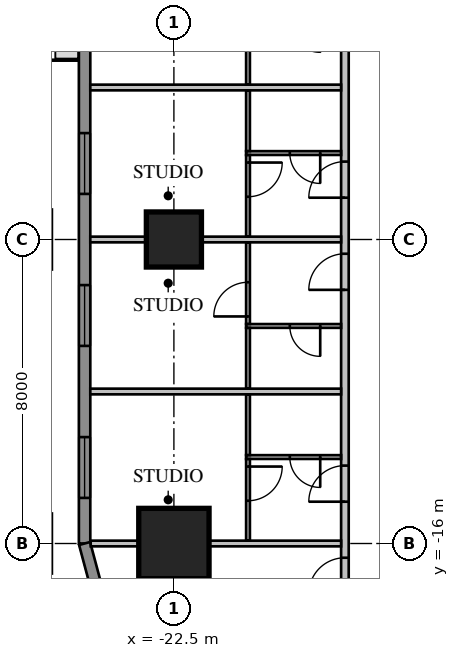
"""IFC4 building model, lengths in metres.
Left out: names, types, materials, properties, quantities, classifications, styles, units other than length and angle.
Written with IfcOpenShell. Run it as: python <this file> out.ifc"""

import sys

from ifc_helpers import new_model, si_unit, direction, frame, frame_2d, origin, origin_2d, place, context, subcontext, project, spatial, rectangle, extrude, element, fill, save


model = new_model("IFC4")
c1 = context("Model", 3, precision=1e-05, world=origin(), true_north=direction((0.0, 1.0)))
c2 = subcontext(c1, "Body", "Model", "MODEL_VIEW")
j1 = project(units=[si_unit("LENGTHUNIT", "METRE"), si_unit("PLANEANGLEUNIT", "RADIAN")], contexts=[c1])
p1 = place(None, origin())
s1 = spatial("IfcSite", under=j1, at=p1, CompositionType="ELEMENT")
p2 = place(p1, origin())
s2 = spatial("IfcBuilding", under=s1, at=p2, CompositionType="ELEMENT")
p3 = place(p2, frame((0.0, 0.0, 46.8)))
s3 = spatial("IfcBuildingStorey", under=s2, at=p3, CompositionType="ELEMENT", Elevation=46.8)
p4 = place(p3, frame((-22.5, -8.0, 0.0), z_axis=(0.0, 0.0, 1.0), x_axis=(1.0, 0.0, 0.0)))
e1 = element("IfcColumn", 1, at=p4, inside=s3, PredefinedType="COLUMN", context=c2, shape_type="SweptSolid", body=[
    extrude(rectangle(XDim=1.45, YDim=1.45, at=origin_2d()), origin(), (0.0, 0.0, 1.0), 3.85),
])
p5 = place(p3, frame((-22.5, -16.0, 0.0), z_axis=(0.0, 0.0, 1.0), x_axis=(1.0, 0.0, 0.0)))
e2 = element("IfcColumn", 2, at=p5, inside=s3, PredefinedType="COLUMN", context=c2, shape_type="SweptSolid", body=[
    extrude(rectangle(XDim=1.85, YDim=1.85, at=origin_2d()), origin(), (0.0, 0.0, 1.0), 3.85),
])
p6 = place(p3, frame((-24.85, 16.0, 0.0), z_axis=(0.0, 0.0, 1.0), x_axis=(0.0, -1.0, 0.0)))
e3 = element("IfcWall", 3, at=p6, inside=s3, PredefinedType="SOLIDWALL", context=c2, shape_type="SweptSolid", body=[
    extrude(rectangle(XDim=32.0, YDim=0.3, at=frame_2d((16.0, 0.0))), origin(), (0.0, 0.0, 1.0), 3.65),
])
p7 = place(p6, frame((1.2, 0.0, 0.75)))
e4 = element("IfcOpeningElement", 4, at=p7, cuts=e3, PredefinedType="OPENING", context=c2, shape_type="SweptSolid", body=[
    extrude(rectangle(XDim=1.6, YDim=1.8, at=frame_2d((0.8, 0.9))), frame((0.0, 0.17, 0.0), z_axis=(0.0, -1.0, 0.0), x_axis=(1.0, 0.0, 0.0)), (0.0, 0.0, 1.0), 0.34),
])
p8 = place(p6, frame((5.2, 0.0, 0.75)))
e5 = element("IfcOpeningElement", 5, at=p8, cuts=e3, PredefinedType="OPENING", context=c2, shape_type="SweptSolid", body=[
    extrude(rectangle(XDim=1.6, YDim=1.8, at=frame_2d((0.8, 0.9))), frame((0.0, 0.17, 0.0), z_axis=(0.0, -1.0, 0.0), x_axis=(1.0, 0.0, 0.0)), (0.0, 0.0, 1.0), 0.34),
])
p9 = place(p6, frame((17.2, 0.0, 0.75)))
e6 = element("IfcOpeningElement", 6, at=p9, cuts=e3, PredefinedType="OPENING", context=c2, shape_type="SweptSolid", body=[
    extrude(rectangle(XDim=1.6, YDim=1.8, at=frame_2d((0.8, 0.9))), frame((0.0, 0.17, 0.0), z_axis=(0.0, -1.0, 0.0), x_axis=(1.0, 0.0, 0.0)), (0.0, 0.0, 1.0), 0.34),
])
p10 = place(p6, frame((21.2, 0.0, 0.75)))
e7 = element("IfcOpeningElement", 7, at=p10, cuts=e3, PredefinedType="OPENING", context=c2, shape_type="SweptSolid", body=[
    extrude(rectangle(XDim=1.6, YDim=1.8, at=frame_2d((0.8, 0.9))), frame((0.0, 0.17, 0.0), z_axis=(0.0, -1.0, 0.0), x_axis=(1.0, 0.0, 0.0)), (0.0, 0.0, 1.0), 0.34),
])
p11 = place(p6, frame((25.2, 0.0, 0.75)))
e8 = element("IfcOpeningElement", 8, at=p11, cuts=e3, PredefinedType="OPENING", context=c2, shape_type="SweptSolid", body=[
    extrude(rectangle(XDim=1.6, YDim=1.8, at=frame_2d((0.8, 0.9))), frame((0.0, 0.17, 0.0), z_axis=(0.0, -1.0, 0.0), x_axis=(1.0, 0.0, 0.0)), (0.0, 0.0, 1.0), 0.34),
])
p12 = place(p6, frame((29.2, 0.0, 0.75)))
e9 = element("IfcOpeningElement", 9, at=p12, cuts=e3, PredefinedType="OPENING", context=c2, shape_type="SweptSolid", body=[
    extrude(rectangle(XDim=1.6, YDim=1.8, at=frame_2d((0.8, 0.9))), frame((0.0, 0.17, 0.0), z_axis=(0.0, -1.0, 0.0), x_axis=(1.0, 0.0, 0.0)), (0.0, 0.0, 1.0), 0.34),
])
p13 = place(p6, frame((8.8, 0.0, 0.75)))
e10 = element("IfcOpeningElement", 10, at=p13, cuts=e3, PredefinedType="OPENING", context=c2, shape_type="SweptSolid", body=[
    extrude(rectangle(XDim=2.4, YDim=1.8, at=frame_2d((1.2, 0.9))), frame((0.0, 0.17, 0.0), z_axis=(0.0, -1.0, 0.0), x_axis=(1.0, 0.0, 0.0)), (0.0, 0.0, 1.0), 0.34),
])
p14 = place(p6, frame((13.812, 0.0, 0.0)))
e11 = element("IfcOpeningElement", 11, at=p14, cuts=e3, PredefinedType="OPENING", context=c2, shape_type="SweptSolid", body=[
    extrude(rectangle(XDim=1.0, YDim=2.4, at=frame_2d((0.5, 1.2))), frame((0.0, 0.17, 0.0), z_axis=(0.0, -1.0, 0.0), x_axis=(1.0, 0.0, 0.0)), (0.0, 0.0, 1.0), 0.34),
])
p15 = place(p3, frame((-24.85, -16.0, 0.0), z_axis=(0.0, 0.0, 1.0), x_axis=(0.258839972501, -0.965920218567, 0.0)))
e12 = element("IfcWall", 12, at=p15, inside=s3, PredefinedType="SOLIDWALL", context=c2, shape_type="SweptSolid", body=[
    extrude(rectangle(XDim=4.581, YDim=0.3, at=frame_2d((2.291, 0.0))), origin(), (0.0, 0.0, 1.0), 3.65),
])
p16 = place(p3, frame((-18.0, 18.0, 0.0), z_axis=(0.0, 0.0, 1.0), x_axis=(0.0, -1.0, 0.0)))
e13 = element("IfcWall", 13, at=p16, inside=s3, PredefinedType="PARTITIONING", context=c2, shape_type="SweptSolid", body=[
    extrude(rectangle(XDim=36.0, YDim=0.2, at=frame_2d((18.0, 0.0))), origin(), (0.0, 0.0, 1.0), 3.65),
])
p17 = place(p16, frame((0.375, 0.0, 0.0)))
e14 = element("IfcOpeningElement", 14, at=p17, cuts=e13, PredefinedType="OPENING", context=c2, shape_type="SweptSolid", body=[
    extrude(rectangle(XDim=1.0, YDim=2.1, at=frame_2d((0.5, 1.05))), frame((0.0, 0.12, 0.0), z_axis=(0.0, -1.0, 0.0), x_axis=(1.0, 0.0, 0.0)), (0.0, 0.0, 1.0), 0.24),
])
p18 = place(p16, frame((2.375, 0.0, 0.0)))
e15 = element("IfcOpeningElement", 15, at=p18, cuts=e13, PredefinedType="OPENING", context=c2, shape_type="SweptSolid", body=[
    extrude(rectangle(XDim=0.95, YDim=2.1, at=frame_2d((0.475, 1.05))), frame((0.0, 0.12, 0.0), z_axis=(0.0, -1.0, 0.0), x_axis=(1.0, 0.0, 0.0)), (0.0, 0.0, 1.0), 0.24),
])
p19 = place(p16, frame((7.95, 0.0, 0.0)))
e16 = element("IfcOpeningElement", 16, at=p19, cuts=e13, PredefinedType="OPENING", context=c2, shape_type="SweptSolid", body=[
    extrude(rectangle(XDim=0.95, YDim=2.1, at=frame_2d((0.475, 1.05))), frame((0.0, 0.12, 0.0), z_axis=(0.0, -1.0, 0.0), x_axis=(1.0, 0.0, 0.0)), (0.0, 0.0, 1.0), 0.24),
])
p20 = place(p16, frame((18.375, 0.0, 0.0)))
e17 = element("IfcOpeningElement", 17, at=p20, cuts=e13, PredefinedType="OPENING", context=c2, shape_type="SweptSolid", body=[
    extrude(rectangle(XDim=0.95, YDim=2.1, at=frame_2d((0.475, 1.05))), frame((0.0, 0.12, 0.0), z_axis=(0.0, -1.0, 0.0), x_axis=(1.0, 0.0, 0.0)), (0.0, 0.0, 1.0), 0.24),
])
p21 = place(p16, frame((23.95, 0.0, 0.0)))
e18 = element("IfcOpeningElement", 18, at=p21, cuts=e13, PredefinedType="OPENING", context=c2, shape_type="SweptSolid", body=[
    extrude(rectangle(XDim=0.95, YDim=2.1, at=frame_2d((0.475, 1.05))), frame((0.0, 0.12, 0.0), z_axis=(0.0, -1.0, 0.0), x_axis=(1.0, 0.0, 0.0)), (0.0, 0.0, 1.0), 0.24),
])
p22 = place(p16, frame((26.375, 0.0, 0.0)))
e19 = element("IfcOpeningElement", 19, at=p22, cuts=e13, PredefinedType="OPENING", context=c2, shape_type="SweptSolid", body=[
    extrude(rectangle(XDim=0.95, YDim=2.1, at=frame_2d((0.475, 1.05))), frame((0.0, 0.12, 0.0), z_axis=(0.0, -1.0, 0.0), x_axis=(1.0, 0.0, 0.0)), (0.0, 0.0, 1.0), 0.24),
])
p23 = place(p16, frame((31.95, 0.0, 0.0)))
e20 = element("IfcOpeningElement", 20, at=p23, cuts=e13, PredefinedType="OPENING", context=c2, shape_type="SweptSolid", body=[
    extrude(rectangle(XDim=0.95, YDim=2.1, at=frame_2d((0.475, 1.05))), frame((0.0, 0.12, 0.0), z_axis=(0.0, -1.0, 0.0), x_axis=(1.0, 0.0, 0.0)), (0.0, 0.0, 1.0), 0.24),
])
p24 = place(p16, frame((34.375, 0.0, 0.0)))
e21 = element("IfcOpeningElement", 21, at=p24, cuts=e13, PredefinedType="OPENING", context=c2, shape_type="SweptSolid", body=[
    extrude(rectangle(XDim=0.95, YDim=2.1, at=frame_2d((0.475, 1.05))), frame((0.0, 0.12, 0.0), z_axis=(0.0, -1.0, 0.0), x_axis=(1.0, 0.0, 0.0)), (0.0, 0.0, 1.0), 0.24),
])
p25 = place(p16, frame((11.2, 0.0, 0.0)))
e22 = element("IfcOpeningElement", 22, at=p25, cuts=e13, PredefinedType="OPENING", context=c2, shape_type="SweptSolid", body=[
    extrude(rectangle(XDim=1.0, YDim=2.1, at=frame_2d((0.5, 1.05))), frame((0.0, 0.12, 0.0), z_axis=(0.0, -1.0, 0.0), x_axis=(1.0, 0.0, 0.0)), (0.0, 0.0, 1.0), 0.24),
])
for number, where, z_axis, x_axis in (
    (23, (-18.1, -4.0, 0.0), (0.0, 0.0, 1.0), (-1.0, 0.0, 0.0)),
    (24, (-18.1, -8.0, 0.0), (0.0, 0.0, 1.0), (-1.0, 0.0, 0.0)),
    (25, (-18.1, -12.0, 0.0), (0.0, 0.0, 1.0), (-1.0, 0.0, 0.0)),
):
    element("IfcWall", number, at=place(p3, frame(where, z_axis=z_axis, x_axis=x_axis)), inside=s3, PredefinedType="PARTITIONING", context=c2, shape_type="SweptSolid", body=[
        extrude(rectangle(XDim=6.6, YDim=0.15, at=frame_2d((3.3, 0.0))), origin(), (0.0, 0.0, 1.0), 3.65),
    ])
p26 = place(p3, frame((-18.1, -16.0, 0.0), z_axis=(0.0, 0.0, 1.0), x_axis=(-1.0, 0.0, 0.0)))
e26 = element("IfcWall", 26, at=p26, inside=s3, PredefinedType="PARTITIONING", context=c2, shape_type="SweptSolid", body=[
    extrude(rectangle(XDim=6.589, YDim=0.15, at=frame_2d((3.295, 0.0))), origin(), (0.0, 0.0, 1.0), 3.65),
])
p27 = place(p3, frame((-20.55, -2.325, 0.0), z_axis=(0.0, 0.0, 1.0), x_axis=(0.0, -1.0, 0.0)))
e27 = element("IfcWall", 27, at=p27, inside=s3, PredefinedType="PARTITIONING", context=c2, shape_type="SweptSolid", body=[
    extrude(rectangle(XDim=1.6, YDim=0.1, at=frame_2d((0.8, 0.0))), origin(), (0.0, 0.0, 1.0), 3.65),
])
p28 = place(p3, frame((-18.1, -5.725, 0.0), z_axis=(0.0, 0.0, 1.0), x_axis=(-1.0, 0.0, 0.0)))
e28 = element("IfcWall", 28, at=p28, inside=s3, PredefinedType="PARTITIONING", context=c2, shape_type="SweptSolid", body=[
    extrude(rectangle(XDim=2.5, YDim=0.1, at=frame_2d((1.25, 0.0))), origin(), (0.0, 0.0, 1.0), 3.65),
])
p29 = place(p28, frame((0.55, 0.0, 0.0)))
e29 = element("IfcOpeningElement", 29, at=p29, cuts=e28, PredefinedType="OPENING", context=c2, shape_type="SweptSolid", body=[
    extrude(rectangle(XDim=0.8, YDim=2.1, at=frame_2d((0.4, 1.05))), frame((0.0, 0.07, 0.0), z_axis=(0.0, -1.0, 0.0), x_axis=(1.0, 0.0, 0.0)), (0.0, 0.0, 1.0), 0.14),
])
p30 = place(p3, frame((-20.55, -4.075, 0.0), z_axis=(0.0, 0.0, 1.0), x_axis=(0.0, -1.0, 0.0)))
e30 = element("IfcWall", 30, at=p30, inside=s3, PredefinedType="PARTITIONING", context=c2, shape_type="SweptSolid", body=[
    extrude(rectangle(XDim=1.6, YDim=0.1, at=frame_2d((0.8, 0.0))), origin(), (0.0, 0.0, 1.0), 3.65),
])
p31 = place(p3, frame((-18.1, -10.275, 0.0), z_axis=(0.0, 0.0, 1.0), x_axis=(-1.0, 0.0, 0.0)))
e31 = element("IfcWall", 31, at=p31, inside=s3, PredefinedType="PARTITIONING", context=c2, shape_type="SweptSolid", body=[
    extrude(rectangle(XDim=2.5, YDim=0.1, at=frame_2d((1.25, 0.0))), origin(), (0.0, 0.0, 1.0), 3.65),
])
p32 = place(p31, frame((0.55, 0.0, 0.0)))
e32 = element("IfcOpeningElement", 32, at=p32, cuts=e31, PredefinedType="OPENING", context=c2, shape_type="SweptSolid", body=[
    extrude(rectangle(XDim=0.8, YDim=2.1, at=frame_2d((0.4, 1.05))), frame((0.0, 0.07, 0.0), z_axis=(0.0, -1.0, 0.0), x_axis=(1.0, 0.0, 0.0)), (0.0, 0.0, 1.0), 0.14),
])
p33 = place(p3, frame((-20.55, -10.325, 0.0), z_axis=(0.0, 0.0, 1.0), x_axis=(0.0, -1.0, 0.0)))
e33 = element("IfcWall", 33, at=p33, inside=s3, PredefinedType="PARTITIONING", context=c2, shape_type="SweptSolid", body=[
    extrude(rectangle(XDim=1.6, YDim=0.1, at=frame_2d((0.8, 0.0))), origin(), (0.0, 0.0, 1.0), 3.65),
])
p34 = place(p3, frame((-18.1, -13.725, 0.0), z_axis=(0.0, 0.0, 1.0), x_axis=(-1.0, 0.0, 0.0)))
e34 = element("IfcWall", 34, at=p34, inside=s3, PredefinedType="PARTITIONING", context=c2, shape_type="SweptSolid", body=[
    extrude(rectangle(XDim=2.5, YDim=0.1, at=frame_2d((1.25, 0.0))), origin(), (0.0, 0.0, 1.0), 3.65),
])
p35 = place(p34, frame((0.55, 0.0, 0.0)))
e35 = element("IfcOpeningElement", 35, at=p35, cuts=e34, PredefinedType="OPENING", context=c2, shape_type="SweptSolid", body=[
    extrude(rectangle(XDim=0.8, YDim=2.1, at=frame_2d((0.4, 1.05))), frame((0.0, 0.07, 0.0), z_axis=(0.0, -1.0, 0.0), x_axis=(1.0, 0.0, 0.0)), (0.0, 0.0, 1.0), 0.14),
])
p36 = place(p3, frame((-20.55, -12.075, 0.0), z_axis=(0.0, 0.0, 1.0), x_axis=(0.0, -1.0, 0.0)))
e36 = element("IfcWall", 36, at=p36, inside=s3, PredefinedType="PARTITIONING", context=c2, shape_type="SweptSolid", body=[
    extrude(rectangle(XDim=1.6, YDim=0.1, at=frame_2d((0.8, 0.0))), origin(), (0.0, 0.0, 1.0), 3.65),
])
p37 = place(p3, frame((-20.55, -5.775, 0.0), z_axis=(0.0, 0.0, 1.0), x_axis=(0.0, -1.0, 0.0)))
e37 = element("IfcWall", 37, at=p37, inside=s3, PredefinedType="PARTITIONING", context=c2, shape_type="SweptSolid", body=[
    extrude(rectangle(XDim=2.15, YDim=0.1, at=frame_2d((1.075, 0.0))), origin(), (0.0, 0.0, 1.0), 3.65),
])
p38 = place(p37, frame((0.2, 0.0, 0.0)))
e38 = element("IfcOpeningElement", 38, at=p38, cuts=e37, PredefinedType="OPENING", context=c2, shape_type="SweptSolid", body=[
    extrude(rectangle(XDim=0.9, YDim=2.1, at=frame_2d((0.45, 1.05))), frame((0.0, 0.07, 0.0), z_axis=(0.0, -1.0, 0.0), x_axis=(1.0, 0.0, 0.0)), (0.0, 0.0, 1.0), 0.14),
])
p39 = place(p3, frame((-20.55, -8.075, 0.0), z_axis=(0.0, 0.0, 1.0), x_axis=(0.0, -1.0, 0.0)))
e39 = element("IfcWall", 39, at=p39, inside=s3, PredefinedType="PARTITIONING", context=c2, shape_type="SweptSolid", body=[
    extrude(rectangle(XDim=2.15, YDim=0.1, at=frame_2d((1.075, 0.0))), origin(), (0.0, 0.0, 1.0), 3.65),
])
p40 = place(p39, frame((1.05, 0.0, 0.0)))
e40 = element("IfcOpeningElement", 40, at=p40, cuts=e39, PredefinedType="OPENING", context=c2, shape_type="SweptSolid", body=[
    extrude(rectangle(XDim=0.9, YDim=2.1, at=frame_2d((0.45, 1.05))), frame((0.0, 0.07, 0.0), z_axis=(0.0, -1.0, 0.0), x_axis=(1.0, 0.0, 0.0)), (0.0, 0.0, 1.0), 0.14),
])
p41 = place(p3, frame((-20.55, -13.775, 0.0), z_axis=(0.0, 0.0, 1.0), x_axis=(0.0, -1.0, 0.0)))
e41 = element("IfcWall", 41, at=p41, inside=s3, PredefinedType="PARTITIONING", context=c2, shape_type="SweptSolid", body=[
    extrude(rectangle(XDim=2.15, YDim=0.1, at=frame_2d((1.075, 0.0))), origin(), (0.0, 0.0, 1.0), 3.65),
])
p42 = place(p41, frame((0.2, 0.0, 0.0)))
e42 = element("IfcOpeningElement", 42, at=p42, cuts=e41, PredefinedType="OPENING", context=c2, shape_type="SweptSolid", body=[
    extrude(rectangle(XDim=0.9, YDim=2.1, at=frame_2d((0.45, 1.05))), frame((0.0, 0.07, 0.0), z_axis=(0.0, -1.0, 0.0), x_axis=(1.0, 0.0, 0.0)), (0.0, 0.0, 1.0), 0.14),
])
p43 = place(p10, origin())
e43 = element("IfcWindow", 43, at=p43, inside=s3, PartitioningType="SINGLE_PANEL", PredefinedType="WINDOW", context=c2, shape_type="SweptSolid", body=[
    extrude(rectangle(XDim=1.6, YDim=1.8, at=frame_2d((0.8, 0.9))), frame((0.0, 0.03, 0.0), z_axis=(0.0, -1.0, 0.0), x_axis=(1.0, 0.0, 0.0)), (0.0, 0.0, 1.0), 0.06),
])
fill(e7, e43)
p44 = place(p11, origin())
e44 = element("IfcWindow", 44, at=p44, inside=s3, PartitioningType="SINGLE_PANEL", PredefinedType="WINDOW", context=c2, shape_type="SweptSolid", body=[
    extrude(rectangle(XDim=1.6, YDim=1.8, at=frame_2d((0.8, 0.9))), frame((0.0, 0.03, 0.0), z_axis=(0.0, -1.0, 0.0), x_axis=(1.0, 0.0, 0.0)), (0.0, 0.0, 1.0), 0.06),
])
fill(e8, e44)
p45 = place(p12, origin())
e45 = element("IfcWindow", 45, at=p45, inside=s3, PartitioningType="SINGLE_PANEL", PredefinedType="WINDOW", context=c2, shape_type="SweptSolid", body=[
    extrude(rectangle(XDim=1.6, YDim=1.8, at=frame_2d((0.8, 0.9))), frame((0.0, 0.03, 0.0), z_axis=(0.0, -1.0, 0.0), x_axis=(1.0, 0.0, 0.0)), (0.0, 0.0, 1.0), 0.06),
])
fill(e9, e45)
p46 = place(p21, origin())
e46 = element("IfcDoor", 46, at=p46, inside=s3, OperationType="SINGLE_SWING_RIGHT", PredefinedType="DOOR", context=c2, shape_type="SweptSolid", body=[
    extrude(rectangle(XDim=0.95, YDim=2.1, at=frame_2d((0.475, 1.05))), frame((0.0, 0.025, 0.0), z_axis=(0.0, -1.0, 0.0), x_axis=(1.0, 0.0, 0.0)), (0.0, 0.0, 1.0), 0.05),
])
fill(e18, e46)
p47 = place(p29, origin())
e47 = element("IfcDoor", 47, at=p47, inside=s3, OperationType="SINGLE_SWING_LEFT", PredefinedType="DOOR", context=c2, shape_type="SweptSolid", body=[
    extrude(rectangle(XDim=0.8, YDim=2.1, at=frame_2d((0.4, 1.05))), frame((0.0, 0.025, 0.0), z_axis=(0.0, -1.0, 0.0), x_axis=(1.0, 0.0, 0.0)), (0.0, 0.0, 1.0), 0.05),
])
fill(e29, e47)
p48 = place(p22, origin())
e48 = element("IfcDoor", 48, at=p48, inside=s3, OperationType="SINGLE_SWING_RIGHT", PredefinedType="DOOR", context=c2, shape_type="SweptSolid", body=[
    extrude(rectangle(XDim=0.95, YDim=2.1, at=frame_2d((0.475, 1.05))), frame((0.0, 0.025, 0.0), z_axis=(0.0, -1.0, 0.0), x_axis=(1.0, 0.0, 0.0)), (0.0, 0.0, 1.0), 0.05),
])
fill(e19, e48)
p49 = place(p32, origin())
e49 = element("IfcDoor", 49, at=p49, inside=s3, OperationType="SINGLE_SWING_LEFT", PredefinedType="DOOR", context=c2, shape_type="SweptSolid", body=[
    extrude(rectangle(XDim=0.8, YDim=2.1, at=frame_2d((0.4, 1.05))), frame((0.0, 0.025, 0.0), z_axis=(0.0, -1.0, 0.0), x_axis=(1.0, 0.0, 0.0)), (0.0, 0.0, 1.0), 0.05),
])
fill(e32, e49)
p50 = place(p23, origin())
e50 = element("IfcDoor", 50, at=p50, inside=s3, OperationType="SINGLE_SWING_RIGHT", PredefinedType="DOOR", context=c2, shape_type="SweptSolid", body=[
    extrude(rectangle(XDim=0.95, YDim=2.1, at=frame_2d((0.475, 1.05))), frame((0.0, 0.025, 0.0), z_axis=(0.0, -1.0, 0.0), x_axis=(1.0, 0.0, 0.0)), (0.0, 0.0, 1.0), 0.05),
])
fill(e20, e50)
p51 = place(p35, origin())
e51 = element("IfcDoor", 51, at=p51, inside=s3, OperationType="SINGLE_SWING_LEFT", PredefinedType="DOOR", context=c2, shape_type="SweptSolid", body=[
    extrude(rectangle(XDim=0.8, YDim=2.1, at=frame_2d((0.4, 1.05))), frame((0.0, 0.025, 0.0), z_axis=(0.0, -1.0, 0.0), x_axis=(1.0, 0.0, 0.0)), (0.0, 0.0, 1.0), 0.05),
])
fill(e35, e51)
p52 = place(p24, origin())
e52 = element("IfcDoor", 52, at=p52, inside=s3, OperationType="SINGLE_SWING_RIGHT", PredefinedType="DOOR", context=c2, shape_type="SweptSolid", body=[
    extrude(rectangle(XDim=0.95, YDim=2.1, at=frame_2d((0.475, 1.05))), frame((0.0, 0.025, 0.0), z_axis=(0.0, -1.0, 0.0), x_axis=(1.0, 0.0, 0.0)), (0.0, 0.0, 1.0), 0.05),
])
fill(e21, e52)
p53 = place(p38, origin())
e53 = element("IfcDoor", 53, at=p53, inside=s3, OperationType="SINGLE_SWING_LEFT", PredefinedType="DOOR", context=c2, shape_type="SweptSolid", body=[
    extrude(rectangle(XDim=0.9, YDim=2.1, at=frame_2d((0.45, 1.05))), frame((0.0, 0.025, 0.0), z_axis=(0.0, -1.0, 0.0), x_axis=(1.0, 0.0, 0.0)), (0.0, 0.0, 1.0), 0.05),
])
fill(e38, e53)
p54 = place(p40, origin())
e54 = element("IfcDoor", 54, at=p54, inside=s3, OperationType="SINGLE_SWING_RIGHT", PredefinedType="DOOR", context=c2, shape_type="SweptSolid", body=[
    extrude(rectangle(XDim=0.9, YDim=2.1, at=frame_2d((0.45, 1.05))), frame((0.0, 0.025, 0.0), z_axis=(0.0, -1.0, 0.0), x_axis=(1.0, 0.0, 0.0)), (0.0, 0.0, 1.0), 0.05),
])
fill(e40, e54)
p55 = place(p42, origin())
e55 = element("IfcDoor", 55, at=p55, inside=s3, OperationType="SINGLE_SWING_LEFT", PredefinedType="DOOR", context=c2, shape_type="SweptSolid", body=[
    extrude(rectangle(XDim=0.9, YDim=2.1, at=frame_2d((0.45, 1.05))), frame((0.0, 0.025, 0.0), z_axis=(0.0, -1.0, 0.0), x_axis=(1.0, 0.0, 0.0)), (0.0, 0.0, 1.0), 0.05),
])
fill(e42, e55)
save(model, sys.argv[1])
